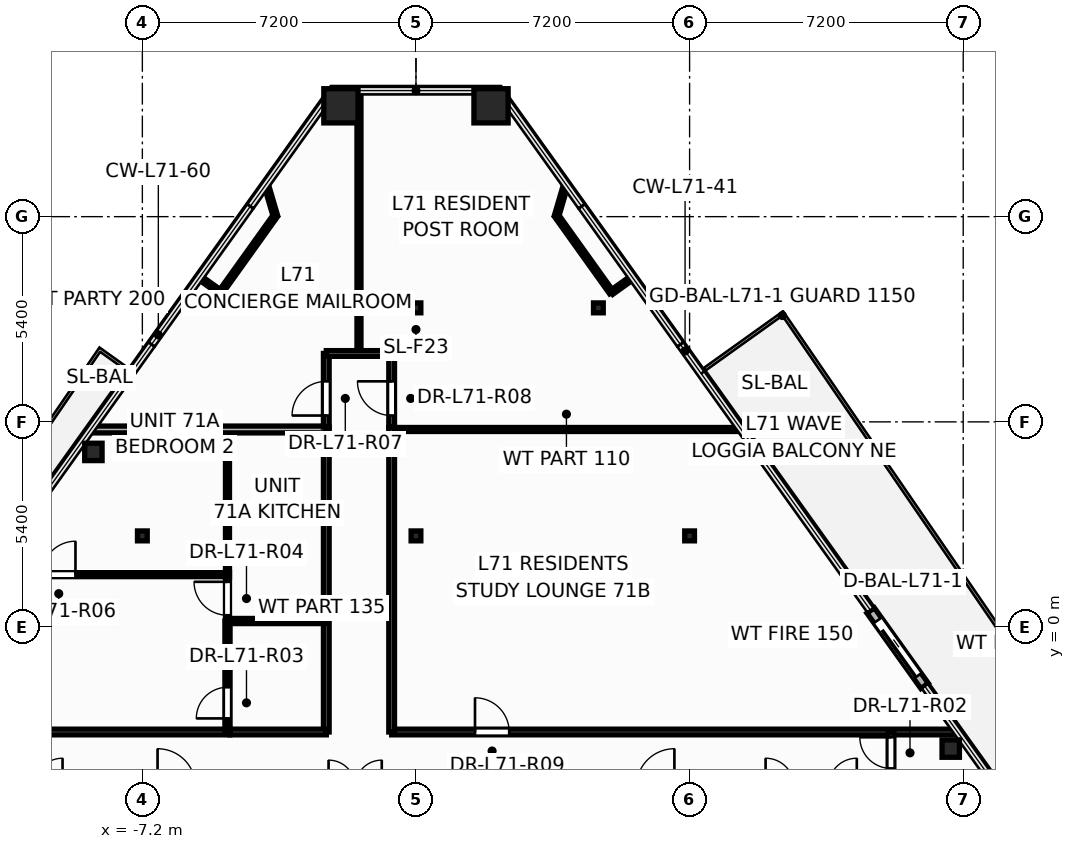
"""IFC4 building model, lengths in metres.
Left out: names, types, materials, properties, quantities, classifications, styles, units other than length and angle.
Written with IfcOpenShell. Run it as: python <this file> out.ifc"""

import sys

from ifc_helpers import new_model, si_unit, direction, frame, frame_2d, origin, origin_2d, place, context, subcontext, project, spatial, rectangle, hollow_rectangle, hollow_circle, i_section, extrude, element, fill, save


model = new_model("IFC4")
c1 = context("Model", 3, precision=1e-05, world=origin(), true_north=direction((0.0, 1.0)))
c2 = subcontext(c1, "Body", "Model", "MODEL_VIEW")
j1 = project(units=[si_unit("LENGTHUNIT", "METRE"), si_unit("PLANEANGLEUNIT", "RADIAN")], contexts=[c1])
p1 = place(None, origin())
s1 = spatial("IfcSite", under=j1, at=p1, CompositionType="ELEMENT")
p2 = place(p1, origin())
s2 = spatial("IfcBuilding", under=s1, at=p2, CompositionType="ELEMENT")
p3 = place(p2, frame((0.0, 0.0, 270.6)))
s3 = spatial("IfcBuildingStorey", under=s2, at=p3, CompositionType="ELEMENT", Elevation=270.6)
for number, where, z_axis, x_axis in (
    (1, (1.975, 13.717, 0.0), (0.0, 0.0, 1.0), (1.0, 0.0, 0.0)),
    (2, (-1.975, 13.717, 0.0), (0.0, 0.0, 1.0), (1.0, 0.0, 0.0)),
):
    element("IfcColumn", number, at=place(p3, frame(where, z_axis=z_axis, x_axis=x_axis)), inside=s3, PredefinedType="COLUMN", context=c2, shape_type="SweptSolid", body=[
        extrude(hollow_rectangle(XDim=0.9, YDim=0.9, WallThickness=0.04, at=origin_2d()), origin(), (0.0, 0.0, 1.0), 3.6),
    ])
for number, where, z_axis, x_axis in (
    (3, (14.072, -3.196, 0.0), (0.0, 0.0, 1.0), (1.0, 0.0, 0.0)),
    (4, (8.489, 4.61, 0.0), (0.0, 0.0, 1.0), (1.0, 0.0, 0.0)),
    (5, (-8.489, 4.61, 0.0), (0.0, 0.0, 1.0), (1.0, 0.0, 0.0)),
):
    element("IfcColumn", number, at=place(p3, frame(where, z_axis=z_axis, x_axis=x_axis)), inside=s3, PredefinedType="COLUMN", context=c2, shape_type="SweptSolid", body=[
        extrude(hollow_circle(Radius=0.229, WallThickness=0.016, at=origin_2d()), origin(), (0.0, 0.0, 1.0), 3.6),
    ])
for number, where, z_axis, x_axis in (
    (6, (-7.2, 2.4, 0.0), (0.0, 0.0, 1.0), (1.0, 0.0, 0.0)),
    (7, (0.0, 2.4, 0.0), (0.0, 0.0, 1.0), (1.0, 0.0, 0.0)),
    (8, (7.2, 2.4, 0.0), (0.0, 0.0, 1.0), (1.0, 0.0, 0.0)),
    (9, (-4.8, 8.4, 0.0), (0.0, 0.0, 1.0), (1.0, 0.0, 0.0)),
    (10, (0.0, 8.4, 0.0), (0.0, 0.0, 1.0), (1.0, 0.0, 0.0)),
    (11, (4.8, 8.4, 0.0), (0.0, 0.0, 1.0), (1.0, 0.0, 0.0)),
):
    element("IfcColumn", number, at=place(p3, frame(where, z_axis=z_axis, x_axis=x_axis)), inside=s3, PredefinedType="COLUMN", context=c2, shape_type="SweptSolid", body=[
        extrude(i_section(OverallWidth=0.256, OverallDepth=0.26, WebThickness=0.01, FlangeThickness=0.017, at=origin_2d()), origin(), (0.0, 0.0, 1.0), 3.6),
    ])
p4 = place(p3, frame((13.383, -1.547, -0.015), z_axis=(0.0, 0.0, 1.0), x_axis=(-0.58167352525, 0.813422344187, 0.0)))
e12 = element("IfcWall", 12, at=p4, inside=s3, PredefinedType="STANDARD", context=c2, shape_type="SweptSolid", body=[
    extrude(rectangle(XDim=2.44, YDim=0.24, at=frame_2d((1.22, 0.0))), origin(), (0.0, 0.0, 1.0), 2.878),
])
p5 = place(p4, frame((0.32, 0.0, 0.015)))
e13 = element("IfcOpeningElement", 13, at=p5, cuts=e12, PredefinedType="OPENING", context=c2, shape_type="SweptSolid", body=[
    extrude(rectangle(XDim=1.806, YDim=2.204, at=frame_2d((0.9, 1.102))), frame((0.0, 0.13, 0.0), z_axis=(0.0, -1.0, 0.0), x_axis=(1.0, 0.0, 0.0)), (0.0, 0.0, 1.0), 0.26),
])
p6 = place(p3, frame((-0.64, -2.76, 0.0), z_axis=(0.0, 0.0, 1.0), x_axis=(1.0, 0.0, 0.0)))
e14 = element("IfcWall", 14, at=p6, inside=s3, PredefinedType="PARTITIONING", context=c2, shape_type="SweptSolid", body=[
    extrude(rectangle(XDim=14.891, YDim=0.15, at=frame_2d((7.446, 0.0))), origin(), (0.0, 0.0, 1.0), 2.32),
])
p7 = place(p6, frame((2.193, 0.0, 0.0)))
e15 = element("IfcOpeningElement", 15, at=p7, cuts=e14, PredefinedType="OPENING", context=c2, shape_type="SweptSolid", body=[
    extrude(rectangle(XDim=0.906, YDim=2.104, at=frame_2d((0.45, 1.052))), frame((0.0, 0.085, 0.0), z_axis=(0.0, -1.0, 0.0), x_axis=(1.0, 0.0, 0.0)), (0.0, 0.0, 1.0), 0.17),
])
p8 = place(p3, frame((-14.251, -2.76, 0.0), z_axis=(0.0, 0.0, 1.0), x_axis=(1.0, 0.0, 0.0)))
e16 = element("IfcWall", 16, at=p8, inside=s3, PredefinedType="PARTITIONING", context=c2, shape_type="SweptSolid", body=[
    extrude(rectangle(XDim=9.351, YDim=0.15, at=frame_2d((4.676, 0.0))), origin(), (0.0, 0.0, 1.0), 2.32),
])
p9 = place(p8, frame((3.386, 0.0, 0.0)))
e17 = element("IfcOpeningElement", 17, at=p9, cuts=e16, PredefinedType="OPENING", context=c2, shape_type="SweptSolid", body=[
    extrude(rectangle(XDim=0.906, YDim=2.104, at=frame_2d((0.45, 1.052))), frame((0.0, 0.085, 0.0), z_axis=(0.0, -1.0, 0.0), x_axis=(1.0, 0.0, 0.0)), (0.0, 0.0, 1.0), 0.17),
])
p10 = place(p3, frame((-0.64, 5.2, 0.0), z_axis=(0.0, 0.0, 1.0), x_axis=(1.0, 0.0, 0.0)))
e18 = element("IfcWall", 18, at=p10, inside=s3, PredefinedType="PARTITIONING", context=c2, shape_type="SweptSolid", body=[
    extrude(rectangle(XDim=9.198, YDim=0.105, at=frame_2d((4.599, 0.0))), origin(), (0.0, 0.0, 1.0), 2.32),
])
p11 = place(p3, frame((-0.64, -2.76, 0.0), z_axis=(0.0, 0.0, 1.0), x_axis=(0.0, 1.0, 0.0)))
e19 = element("IfcWall", 19, at=p11, inside=s3, PredefinedType="PARTITIONING", context=c2, shape_type="SweptSolid", body=[
    extrude(rectangle(XDim=8.02, YDim=0.15, at=frame_2d((4.01, 0.0))), origin(), (0.0, 0.0, 1.0), 2.32),
])
p12 = place(p3, frame((-1.5, 7.2, 0.0), z_axis=(0.0, 0.0, 1.0), x_axis=(0.0, 1.0, 0.0)))
e20 = element("IfcWall", 20, at=p12, inside=s3, PredefinedType="PARTITIONING", context=c2, shape_type="SweptSolid", body=[
    extrude(rectangle(XDim=6.917, YDim=0.105, at=frame_2d((3.458, 0.0))), origin(), (0.0, 0.0, 1.0), 2.718),
])
p13 = place(p3, frame((-11.29, 1.38, 0.0), z_axis=(0.0, 0.0, 1.0), x_axis=(1.0, 0.0, 0.0)))
e21 = element("IfcWall", 21, at=p13, inside=s3, PredefinedType="PARTITIONING", context=c2, shape_type="SweptSolid", body=[
    extrude(rectangle(XDim=6.33, YDim=0.105, at=frame_2d((3.165, 0.0))), origin(), (0.0, 0.0, 1.0), 2.32),
])
p14 = place(p13, frame((1.45, 0.0, 0.0)))
e22 = element("IfcOpeningElement", 22, at=p14, cuts=e21, PredefinedType="OPENING", context=c2, shape_type="SweptSolid", body=[
    extrude(rectangle(XDim=0.886, YDim=2.104, at=frame_2d((0.44, 1.052))), frame((0.0, 0.062, 0.0), z_axis=(0.0, -1.0, 0.0), x_axis=(1.0, 0.0, 0.0)), (0.0, 0.0, 1.0), 0.125),
])
p15 = place(p3, frame((-2.36, -2.76, 0.0), z_axis=(0.0, 0.0, 1.0), x_axis=(0.0, 1.0, 0.0)))
e23 = element("IfcWall", 23, at=p15, inside=s3, PredefinedType="PARTITIONING", context=c2, shape_type="SweptSolid", body=[
    extrude(rectangle(XDim=8.02, YDim=0.15, at=frame_2d((4.01, 0.0))), origin(), (0.0, 0.0, 1.0), 2.32),
])
p16 = place(p3, frame((-4.96, 1.32, 0.0), z_axis=(0.0, 0.0, 1.0), x_axis=(0.0, 1.0, 0.0)))
e24 = element("IfcWall", 24, at=p16, inside=s3, PredefinedType="PARTITIONING", context=c2, shape_type="SweptSolid", body=[
    extrude(rectangle(XDim=3.88, YDim=0.105, at=frame_2d((1.94, 0.0))), origin(), (0.0, 0.0, 1.0), 2.32),
])
p17 = place(p3, frame((-8.558, 5.2, 0.0), z_axis=(0.0, 0.0, 1.0), x_axis=(1.0, 0.0, 0.0)))
e25 = element("IfcWall", 25, at=p17, inside=s3, PredefinedType="PARTITIONING", context=c2, shape_type="SweptSolid", body=[
    extrude(rectangle(XDim=6.198, YDim=0.18, at=frame_2d((3.099, 0.0))), origin(), (0.0, 0.0, 1.0), 2.718),
])
p18 = place(p3, frame((-4.96, -2.76, 0.0), z_axis=(0.0, 0.0, 1.0), x_axis=(0.0, 1.0, 0.0)))
e26 = element("IfcWall", 26, at=p18, inside=s3, PredefinedType="PARTITIONING", context=c2, shape_type="SweptSolid", body=[
    extrude(rectangle(XDim=2.92, YDim=0.135, at=frame_2d((1.46, 0.0))), origin(), (0.0, 0.0, 1.0), 3.345),
])
p19 = place(p18, frame((0.357, 0.0, 0.0)))
e27 = element("IfcOpeningElement", 27, at=p19, cuts=e26, PredefinedType="OPENING", context=c2, shape_type="SweptSolid", body=[
    extrude(rectangle(XDim=0.826, YDim=2.104, at=frame_2d((0.41, 1.052))), frame((0.0, 0.078, 0.0), z_axis=(0.0, -1.0, 0.0), x_axis=(1.0, 0.0, 0.0)), (0.0, 0.0, 1.0), 0.155),
])
p20 = place(p3, frame((-4.898, -2.76, 0.0), z_axis=(0.0, 0.0, 1.0), x_axis=(1.0, 0.0, 0.0)))
e28 = element("IfcWall", 28, at=p20, inside=s3, PredefinedType="PARTITIONING", context=c2, shape_type="SweptSolid", body=[
    extrude(rectangle(XDim=2.538, YDim=0.15, at=frame_2d((1.269, 0.0))), origin(), (0.0, 0.0, 1.0), 2.964),
])
p21 = place(p3, frame((-4.96, 0.16, 0.0), z_axis=(0.0, 0.0, 1.0), x_axis=(1.0, 0.0, 0.0)))
e29 = element("IfcWall", 29, at=p21, inside=s3, PredefinedType="PARTITIONING", context=c2, shape_type="SweptSolid", body=[
    extrude(rectangle(XDim=2.6, YDim=0.135, at=frame_2d((1.3, 0.0))), origin(), (0.0, 0.0, 1.0), 2.964),
])
for number, where, z_axis, x_axis in (
    (30, (-3.701, 10.822, 0.0), (0.0, 0.0, 1.0), (-0.582, -0.813, 0.0)),
    (31, (5.144, 8.805, 0.0), (0.0, 0.0, 1.0), (-0.582, 0.813, 0.0)),
):
    element("IfcWall", number, at=place(p3, frame(where, z_axis=z_axis, x_axis=x_axis)), inside=s3, PredefinedType="PARTITIONING", context=c2, shape_type="SweptSolid", body=[
        extrude(rectangle(XDim=2.48, YDim=0.12, at=frame_2d((1.24, 0.0))), origin(), (0.0, 0.0, 1.0), 2.718),
    ])
p22 = place(p3, frame((-2.36, 5.262, 0.0), z_axis=(0.0, 0.0, 1.0), x_axis=(0.0, 1.0, 0.0)))
e32 = element("IfcWall", 32, at=p22, inside=s3, PredefinedType="PARTITIONING", context=c2, shape_type="SweptSolid", body=[
    extrude(rectangle(XDim=1.938, YDim=0.15, at=frame_2d((0.969, 0.0))), origin(), (0.0, 0.0, 1.0), 2.964),
])
p23 = place(p22, frame((0.305, 0.0, 0.0)))
e33 = element("IfcOpeningElement", 33, at=p23, cuts=e32, PredefinedType="OPENING", context=c2, shape_type="SweptSolid", body=[
    extrude(rectangle(XDim=0.906, YDim=2.104, at=frame_2d((0.45, 1.052))), frame((0.0, 0.085, 0.0), z_axis=(0.0, -1.0, 0.0), x_axis=(1.0, 0.0, 0.0)), (0.0, 0.0, 1.0), 0.17),
])
p24 = place(p3, frame((-0.64, 5.262, 0.0), z_axis=(0.0, 0.0, 1.0), x_axis=(0.0, 1.0, 0.0)))
e34 = element("IfcWall", 34, at=p24, inside=s3, PredefinedType="PARTITIONING", context=c2, shape_type="SweptSolid", body=[
    extrude(rectangle(XDim=1.938, YDim=0.15, at=frame_2d((0.969, 0.0))), origin(), (0.0, 0.0, 1.0), 3.345),
])
p25 = place(p24, frame((0.305, 0.0, 0.0)))
e35 = element("IfcOpeningElement", 35, at=p25, cuts=e34, PredefinedType="OPENING", context=c2, shape_type="SweptSolid", body=[
    extrude(rectangle(XDim=0.906, YDim=2.104, at=frame_2d((0.45, 1.052))), frame((0.0, 0.085, 0.0), z_axis=(0.0, -1.0, 0.0), x_axis=(1.0, 0.0, 0.0)), (0.0, 0.0, 1.0), 0.17),
])
p26 = place(p3, frame((12.5, -4.24, 0.0), z_axis=(0.0, 0.0, 1.0), x_axis=(0.0, 1.0, 0.0)))
e36 = element("IfcWall", 36, at=p26, inside=s3, PredefinedType="PARTITIONING", context=c2, shape_type="SweptSolid", body=[
    extrude(rectangle(XDim=1.48, YDim=0.15, at=frame_2d((0.74, 0.0))), origin(), (0.0, 0.0, 1.0), 2.32),
])
p27 = place(p26, frame((0.522, 0.0, 0.0)))
e37 = element("IfcOpeningElement", 37, at=p27, cuts=e36, PredefinedType="OPENING", context=c2, shape_type="SweptSolid", body=[
    extrude(rectangle(XDim=0.826, YDim=2.104, at=frame_2d((0.41, 1.052))), frame((0.0, 0.085, 0.0), z_axis=(0.0, -1.0, 0.0), x_axis=(1.0, 0.0, 0.0)), (0.0, 0.0, 1.0), 0.17),
])
p28 = place(p3, frame((-4.96, 0.16, 0.0), z_axis=(0.0, 0.0, 1.0), x_axis=(0.0, 1.0, 0.0)))
e38 = element("IfcWall", 38, at=p28, inside=s3, PredefinedType="PARTITIONING", context=c2, shape_type="SweptSolid", body=[
    extrude(rectangle(XDim=1.28, YDim=0.105, at=frame_2d((0.64, 0.0))), origin(), (0.0, 0.0, 1.0), 3.345),
])
p29 = place(p28, frame((0.152, 0.0, 0.0)))
e39 = element("IfcOpeningElement", 39, at=p29, cuts=e38, PredefinedType="OPENING", context=c2, shape_type="SweptSolid", body=[
    extrude(rectangle(XDim=0.886, YDim=2.104, at=frame_2d((0.44, 1.052))), frame((0.0, 0.062, 0.0), z_axis=(0.0, -1.0, 0.0), x_axis=(1.0, 0.0, 0.0)), (0.0, 0.0, 1.0), 0.125),
])
p30 = place(p3, frame((-2.36, 7.2, 0.0), z_axis=(0.0, 0.0, 1.0), x_axis=(1.0, 0.0, 0.0)))
e40 = element("IfcWall", 40, at=p30, inside=s3, PredefinedType="PARTITIONING", context=c2, shape_type="SweptSolid", body=[
    extrude(rectangle(XDim=1.72, YDim=0.15, at=frame_2d((0.86, 0.0))), origin(), (0.0, 0.0, 1.0), 2.964),
])
for number, where, z_axis, x_axis in (
    (41, (-3.941, 11.638, 0.0), (0.0, 0.0, 1.0), (0.282, -0.959, 0.0)),
    (42, (3.701, 10.822, 0.0), (0.0, 0.0, 1.0), (0.282, 0.959, 0.0)),
):
    element("IfcWall", number, at=place(p3, frame(where, z_axis=z_axis, x_axis=x_axis)), inside=s3, PredefinedType="PARTITIONING", context=c2, shape_type="SweptSolid", body=[
        extrude(rectangle(XDim=0.851, YDim=0.12, at=frame_2d((0.425, 0.0))), origin(), (0.0, 0.0, 1.0), 2.718),
    ])
for number, where, z_axis, x_axis in (
    (43, (-5.144, 8.805, 0.0), (0.0, 0.0, 1.0), (-0.813, 0.582, 0.0)),
    (44, (5.689, 9.195, 0.0), (0.0, 0.0, 1.0), (-0.813, -0.582, 0.0)),
):
    element("IfcWall", number, at=place(p3, frame(where, z_axis=z_axis, x_axis=x_axis)), inside=s3, PredefinedType="PARTITIONING", context=c2, shape_type="SweptSolid", body=[
        extrude(rectangle(XDim=0.67, YDim=0.12, at=frame_2d((0.335, 0.0))), origin(), (0.0, 0.0, 1.0), 2.863),
    ])
p31 = place(p5, origin())
e45 = element("IfcDoor", 45, at=p31, inside=s3, OperationType="SLIDING_TO_LEFT", PredefinedType="DOOR", context=c2, shape_type="SweptSolid", body=[
    extrude(rectangle(XDim=1.8, YDim=2.2, at=frame_2d((0.9, 1.1))), frame((0.0, 0.025, 0.0), z_axis=(0.0, -1.0, 0.0), x_axis=(1.0, 0.0, 0.0)), (0.0, 0.0, 1.0), 0.05),
])
fill(e13, e45)
p32 = place(p27, origin())
e46 = element("IfcDoor", 46, at=p32, inside=s3, OperationType="SINGLE_SWING_RIGHT", PredefinedType="DOOR", context=c2, shape_type="SweptSolid", body=[
    extrude(rectangle(XDim=0.82, YDim=2.1, at=frame_2d((0.41, 1.05))), frame((0.0, 0.025, 0.0), z_axis=(0.0, -1.0, 0.0), x_axis=(1.0, 0.0, 0.0)), (0.0, 0.0, 1.0), 0.05),
])
fill(e37, e46)
p33 = place(p19, origin())
e47 = element("IfcDoor", 47, at=p33, inside=s3, OperationType="SINGLE_SWING_LEFT", PredefinedType="DOOR", context=c2, shape_type="SweptSolid", body=[
    extrude(rectangle(XDim=0.82, YDim=2.1, at=frame_2d((0.41, 1.05))), frame((0.0, 0.025, 0.0), z_axis=(0.0, -1.0, 0.0), x_axis=(1.0, 0.0, 0.0)), (0.0, 0.0, 1.0), 0.05),
])
fill(e27, e47)
p34 = place(p29, origin())
e48 = element("IfcDoor", 48, at=p34, inside=s3, OperationType="SINGLE_SWING_RIGHT", PredefinedType="DOOR", context=c2, shape_type="SweptSolid", body=[
    extrude(rectangle(XDim=0.88, YDim=2.1, at=frame_2d((0.44, 1.05))), frame((0.0, 0.025, 0.0), z_axis=(0.0, -1.0, 0.0), x_axis=(1.0, 0.0, 0.0)), (0.0, 0.0, 1.0), 0.05),
])
fill(e39, e48)
p35 = place(p14, origin())
e49 = element("IfcDoor", 49, at=p35, inside=s3, OperationType="SINGLE_SWING_RIGHT", PredefinedType="DOOR", context=c2, shape_type="SweptSolid", body=[
    extrude(rectangle(XDim=0.88, YDim=2.1, at=frame_2d((0.44, 1.05))), frame((0.0, 0.025, 0.0), z_axis=(0.0, -1.0, 0.0), x_axis=(1.0, 0.0, 0.0)), (0.0, 0.0, 1.0), 0.05),
])
fill(e22, e49)
p36 = place(p23, origin())
e50 = element("IfcDoor", 50, at=p36, inside=s3, OperationType="SINGLE_SWING_LEFT", PredefinedType="DOOR", context=c2, shape_type="SweptSolid", body=[
    extrude(rectangle(XDim=0.9, YDim=2.1, at=frame_2d((0.45, 1.05))), frame((0.0, 0.025, 0.0), z_axis=(0.0, -1.0, 0.0), x_axis=(1.0, 0.0, 0.0)), (0.0, 0.0, 1.0), 0.05),
])
fill(e33, e50)
p37 = place(p25, origin())
e51 = element("IfcDoor", 51, at=p37, inside=s3, OperationType="SINGLE_SWING_RIGHT", PredefinedType="DOOR", context=c2, shape_type="SweptSolid", body=[
    extrude(rectangle(XDim=0.9, YDim=2.1, at=frame_2d((0.45, 1.05))), frame((0.0, 0.025, 0.0), z_axis=(0.0, -1.0, 0.0), x_axis=(1.0, 0.0, 0.0)), (0.0, 0.0, 1.0), 0.05),
])
fill(e35, e51)
p38 = place(p7, origin())
e52 = element("IfcDoor", 52, at=p38, inside=s3, OperationType="SINGLE_SWING_LEFT", PredefinedType="DOOR", context=c2, shape_type="SweptSolid", body=[
    extrude(rectangle(XDim=0.9, YDim=2.1, at=frame_2d((0.45, 1.05))), frame((0.0, 0.025, 0.0), z_axis=(0.0, -1.0, 0.0), x_axis=(1.0, 0.0, 0.0)), (0.0, 0.0, 1.0), 0.05),
])
fill(e15, e52)
save(model, sys.argv[1])
